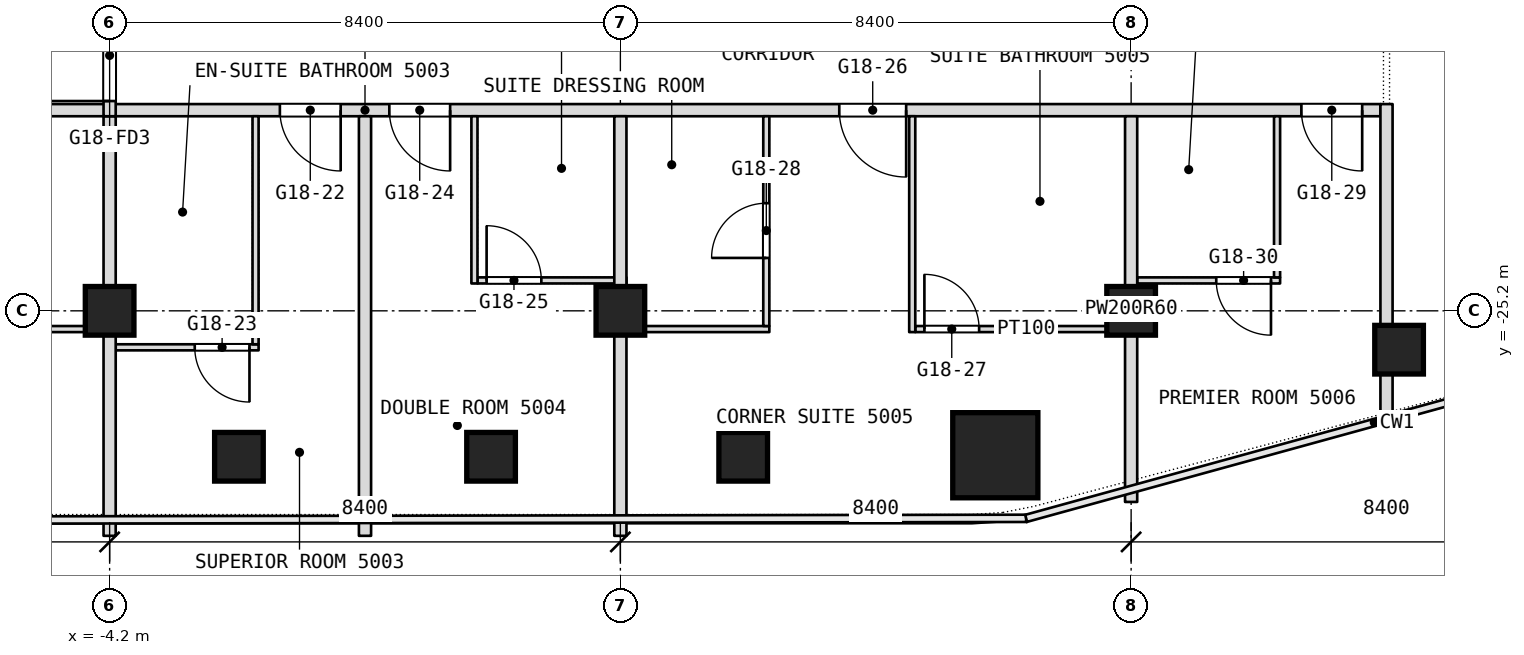
"""IFC4 building model, lengths in metres.
Left out: names, types, materials, properties, quantities, classifications, styles, units other than length and angle.
Written with IfcOpenShell. Run it as: python <this file> out.ifc"""

import sys

from ifc_helpers import new_model, si_unit, direction, frame, frame_2d, origin, origin_2d, place, context, subcontext, project, spatial, rectangle, extrude, element, fill, save


model = new_model("IFC4")
c1 = context("Model", 3, precision=1e-05, world=origin(), true_north=direction((0.0, 1.0)))
c2 = subcontext(c1, "Body", "Model", "MODEL_VIEW")
j1 = project(units=[si_unit("LENGTHUNIT", "METRE"), si_unit("PLANEANGLEUNIT", "RADIAN")], contexts=[c1])
p1 = place(None, origin())
s1 = spatial("IfcSite", under=j1, at=p1, CompositionType="ELEMENT")
p2 = place(p1, origin())
s2 = spatial("IfcBuilding", under=s1, at=p2, CompositionType="ELEMENT")
p3 = place(p2, frame((0.0, 0.0, 216.5)))
s3 = spatial("IfcBuildingStorey", under=s2, at=p3, CompositionType="ELEMENT", Elevation=216.5)
p4 = place(p3, frame((10.366, -27.575, 0.0), z_axis=(0.0, 0.0, 1.0), x_axis=(1.0, 0.0, 0.0)))
e1 = element("IfcColumn", 1, at=p4, inside=s3, PredefinedType="COLUMN", context=c2, shape_type="SweptSolid", body=[
    extrude(rectangle(XDim=1.4, YDim=1.4, at=origin_2d()), origin(), (0.0, 0.0, 1.0), 3.6),
])
for number, where, z_axis, x_axis in (
    (2, (-4.2, -25.2, 0.0), (0.0, 0.0, 1.0), (1.0, 0.0, 0.0)),
    (3, (4.2, -25.2, 0.0), (0.0, 0.0, 1.0), (1.0, 0.0, 0.0)),
    (4, (12.6, -25.2, 0.0), (0.0, 0.0, 1.0), (1.0, 0.0, 0.0)),
    (5, (17.007, -25.839, 0.0), (0.0, 0.0, 1.0), (1.0, 0.0, 0.0)),
    (6, (6.22, -27.6, 0.0), (0.0, 0.0, 1.0), (1.0, 0.0, 0.0)),
    (7, (2.073, -27.6, 0.0), (0.0, 0.0, 1.0), (1.0, 0.0, 0.0)),
    (8, (-2.073, -27.6, 0.0), (0.0, 0.0, 1.0), (1.0, 0.0, 0.0)),
):
    element("IfcColumn", number, at=place(p3, frame(where, z_axis=z_axis, x_axis=x_axis)), inside=s3, PredefinedType="COLUMN", context=c2, shape_type="SweptSolid", body=[
        extrude(rectangle(XDim=0.8, YDim=0.8, at=origin_2d()), origin(), (0.0, 0.0, 1.0), 3.6),
    ])
p5 = place(p3, frame((-4.1, -25.8, 0.0), z_axis=(0.0, 0.0, 1.0), x_axis=(1.0, 0.0, 0.0)))
e9 = element("IfcWall", 9, at=p5, inside=s3, PredefinedType="PARTITIONING", context=c2, shape_type="SweptSolid", body=[
    extrude(rectangle(XDim=2.35, YDim=0.1, at=frame_2d((1.175, 0.0))), origin(), (0.0, 0.0, 1.0), 3.34),
])
p6 = place(p5, frame((1.3, 0.0, 0.0)))
e10 = element("IfcOpeningElement", 10, at=p6, cuts=e9, PredefinedType="OPENING", context=c2, shape_type="SweptSolid", body=[
    extrude(rectangle(XDim=0.9, YDim=2.1, at=frame_2d((0.45, 1.05))), frame((0.0, 0.05, 0.0), z_axis=(0.0, -1.0, 0.0), x_axis=(1.0, 0.0, 0.0)), (0.0, 0.0, 1.0), 0.1),
])
p7 = place(p3, frame((-7.75, -25.5, 0.0), z_axis=(0.0, 0.0, 1.0), x_axis=(1.0, 0.0, 0.0)))
e11 = element("IfcWall", 11, at=p7, inside=s3, PredefinedType="PARTITIONING", context=c2, shape_type="SweptSolid", body=[
    extrude(rectangle(XDim=3.65, YDim=0.1, at=frame_2d((1.825, 0.0))), origin(), (0.0, 0.0, 1.0), 3.34),
])
p8 = place(p7, frame((0.15, 0.0, 0.0)))
e12 = element("IfcOpeningElement", 12, at=p8, cuts=e11, PredefinedType="OPENING", context=c2, shape_type="SweptSolid", body=[
    extrude(rectangle(XDim=0.9, YDim=2.1, at=frame_2d((0.45, 1.05))), frame((0.0, 0.05, 0.0), z_axis=(0.0, -1.0, 0.0), x_axis=(1.0, 0.0, 0.0)), (0.0, 0.0, 1.0), 0.1),
])
p9 = place(p3, frame((4.3, -25.5, 0.0), z_axis=(0.0, 0.0, 1.0), x_axis=(1.0, 0.0, 0.0)))
e13 = element("IfcWall", 13, at=p9, inside=s3, PredefinedType="PARTITIONING", context=c2, shape_type="SweptSolid", body=[
    extrude(rectangle(XDim=2.35, YDim=0.1, at=frame_2d((1.175, 0.0))), origin(), (0.0, 0.0, 1.0), 3.34),
])
p10 = place(p3, frame((9.05, -25.5, 0.0), z_axis=(0.0, 0.0, 1.0), x_axis=(1.0, 0.0, 0.0)))
e14 = element("IfcWall", 14, at=p10, inside=s3, PredefinedType="PARTITIONING", context=c2, shape_type="SweptSolid", body=[
    extrude(rectangle(XDim=3.65, YDim=0.1, at=frame_2d((1.825, 0.0))), origin(), (0.0, 0.0, 1.0), 3.34),
])
p11 = place(p10, frame((0.15, 0.0, 0.0)))
e15 = element("IfcOpeningElement", 15, at=p11, cuts=e14, PredefinedType="OPENING", context=c2, shape_type="SweptSolid", body=[
    extrude(rectangle(XDim=0.9, YDim=2.1, at=frame_2d((0.45, 1.05))), frame((0.0, 0.05, 0.0), z_axis=(0.0, -1.0, 0.0), x_axis=(1.0, 0.0, 0.0)), (0.0, 0.0, 1.0), 0.1),
])
p12 = place(p3, frame((1.85, -24.7, 0.0), z_axis=(0.0, 0.0, 1.0), x_axis=(1.0, 0.0, 0.0)))
e16 = element("IfcWall", 16, at=p12, inside=s3, PredefinedType="PARTITIONING", context=c2, shape_type="SweptSolid", body=[
    extrude(rectangle(XDim=2.45, YDim=0.1, at=frame_2d((1.225, 0.0))), origin(), (0.0, 0.0, 1.0), 3.34),
])
p13 = place(p12, frame((0.15, 0.0, 0.0)))
e17 = element("IfcOpeningElement", 17, at=p13, cuts=e16, PredefinedType="OPENING", context=c2, shape_type="SweptSolid", body=[
    extrude(rectangle(XDim=0.9, YDim=2.1, at=frame_2d((0.45, 1.05))), frame((0.0, 0.05, 0.0), z_axis=(0.0, -1.0, 0.0), x_axis=(1.0, 0.0, 0.0)), (0.0, 0.0, 1.0), 0.1),
])
p14 = place(p3, frame((12.7, -24.7, 0.0), z_axis=(0.0, 0.0, 1.0), x_axis=(1.0, 0.0, 0.0)))
e18 = element("IfcWall", 18, at=p14, inside=s3, PredefinedType="PARTITIONING", context=c2, shape_type="SweptSolid", body=[
    extrude(rectangle(XDim=2.35, YDim=0.1, at=frame_2d((1.175, 0.0))), origin(), (0.0, 0.0, 1.0), 3.34),
])
p15 = place(p14, frame((1.3, 0.0, 0.0)))
e19 = element("IfcOpeningElement", 19, at=p15, cuts=e18, PredefinedType="OPENING", context=c2, shape_type="SweptSolid", body=[
    extrude(rectangle(XDim=0.9, YDim=2.1, at=frame_2d((0.45, 1.05))), frame((0.0, 0.05, 0.0), z_axis=(0.0, -1.0, 0.0), x_axis=(1.0, 0.0, 0.0)), (0.0, 0.0, 1.0), 0.1),
])
p16 = place(p3, frame((-16.7, -21.9, 0.0), z_axis=(0.0, 0.0, 1.0), x_axis=(1.0, 0.0, 0.0)))
e20 = element("IfcWall", 20, at=p16, inside=s3, PredefinedType="PARTITIONING", context=c2, shape_type="SweptSolid", body=[
    extrude(rectangle(XDim=33.4, YDim=0.2, at=frame_2d((16.7, 0.0))), origin(), (0.0, 0.0, 1.0), 3.34),
])
p17 = place(p16, frame((2.7, 0.0, 0.0)))
e21 = element("IfcOpeningElement", 21, at=p17, cuts=e20, PredefinedType="OPENING", context=c2, shape_type="SweptSolid", body=[
    extrude(rectangle(XDim=1.0, YDim=2.1, at=frame_2d((0.5, 1.05))), frame((0.0, 0.1, 0.0), z_axis=(0.0, -1.0, 0.0), x_axis=(1.0, 0.0, 0.0)), (0.0, 0.0, 1.0), 0.2),
])
p18 = place(p16, frame((7.7, 0.0, 0.0)))
e22 = element("IfcOpeningElement", 22, at=p18, cuts=e20, PredefinedType="OPENING", context=c2, shape_type="SweptSolid", body=[
    extrude(rectangle(XDim=1.1, YDim=2.1, at=frame_2d((0.55, 1.05))), frame((0.0, 0.1, 0.0), z_axis=(0.0, -1.0, 0.0), x_axis=(1.0, 0.0, 0.0)), (0.0, 0.0, 1.0), 0.2),
])
p19 = place(p16, frame((15.3, 0.0, 0.0)))
e23 = element("IfcOpeningElement", 23, at=p19, cuts=e20, PredefinedType="OPENING", context=c2, shape_type="SweptSolid", body=[
    extrude(rectangle(XDim=1.0, YDim=2.1, at=frame_2d((0.5, 1.05))), frame((0.0, 0.1, 0.0), z_axis=(0.0, -1.0, 0.0), x_axis=(1.0, 0.0, 0.0)), (0.0, 0.0, 1.0), 0.2),
])
p20 = place(p16, frame((17.1, 0.0, 0.0)))
e24 = element("IfcOpeningElement", 24, at=p20, cuts=e20, PredefinedType="OPENING", context=c2, shape_type="SweptSolid", body=[
    extrude(rectangle(XDim=1.0, YDim=2.1, at=frame_2d((0.5, 1.05))), frame((0.0, 0.1, 0.0), z_axis=(0.0, -1.0, 0.0), x_axis=(1.0, 0.0, 0.0)), (0.0, 0.0, 1.0), 0.2),
])
p21 = place(p16, frame((24.5, 0.0, 0.0)))
e25 = element("IfcOpeningElement", 25, at=p21, cuts=e20, PredefinedType="OPENING", context=c2, shape_type="SweptSolid", body=[
    extrude(rectangle(XDim=1.1, YDim=2.1, at=frame_2d((0.55, 1.05))), frame((0.0, 0.1, 0.0), z_axis=(0.0, -1.0, 0.0), x_axis=(1.0, 0.0, 0.0)), (0.0, 0.0, 1.0), 0.2),
])
p22 = place(p16, frame((32.1, 0.0, 0.0)))
e26 = element("IfcOpeningElement", 26, at=p22, cuts=e20, PredefinedType="OPENING", context=c2, shape_type="SweptSolid", body=[
    extrude(rectangle(XDim=1.0, YDim=2.1, at=frame_2d((0.5, 1.05))), frame((0.0, 0.1, 0.0), z_axis=(0.0, -1.0, 0.0), x_axis=(1.0, 0.0, 0.0)), (0.0, 0.0, 1.0), 0.2),
])
p23 = place(p3, frame((16.8, -27.229, 0.0), z_axis=(0.0, 0.0, 1.0), x_axis=(0.0, 1.0, 0.0)))
e27 = element("IfcWall", 27, at=p23, inside=s3, PredefinedType="PARTITIONING", context=c2, shape_type="SweptSolid", body=[
    extrude(rectangle(XDim=5.429, YDim=0.2, at=frame_2d((2.714, 0.0))), origin(), (0.0, 0.0, 1.0), 3.34),
])
p24 = place(p3, frame((15.0, -24.65, 0.0), z_axis=(0.0, 0.0, 1.0), x_axis=(0.0, 1.0, 0.0)))
e28 = element("IfcWall", 28, at=p24, inside=s3, PredefinedType="PARTITIONING", context=c2, shape_type="SweptSolid", body=[
    extrude(rectangle(XDim=2.65, YDim=0.1, at=frame_2d((1.325, 0.0))), origin(), (0.0, 0.0, 1.0), 3.34),
])
p25 = place(p3, frame((12.6, -28.343, 0.0), z_axis=(0.0, 0.0, 1.0), x_axis=(0.0, 1.0, 0.0)))
e29 = element("IfcWall", 29, at=p25, inside=s3, PredefinedType="PARTITIONING", context=c2, shape_type="SweptSolid", body=[
    extrude(rectangle(XDim=6.343, YDim=0.2, at=frame_2d((3.171, 0.0))), origin(), (0.0, 0.0, 1.0), 3.34),
])
p26 = place(p3, frame((9.0, -25.55, 0.0), z_axis=(0.0, 0.0, 1.0), x_axis=(0.0, 1.0, 0.0)))
e30 = element("IfcWall", 30, at=p26, inside=s3, PredefinedType="PARTITIONING", context=c2, shape_type="SweptSolid", body=[
    extrude(rectangle(XDim=3.55, YDim=0.1, at=frame_2d((1.775, 0.0))), origin(), (0.0, 0.0, 1.0), 3.34),
])
p27 = place(p3, frame((6.6, -25.45, 0.0), z_axis=(0.0, 0.0, 1.0), x_axis=(0.0, 1.0, 0.0)))
e31 = element("IfcWall", 31, at=p27, inside=s3, PredefinedType="PARTITIONING", context=c2, shape_type="SweptSolid", body=[
    extrude(rectangle(XDim=3.45, YDim=0.1, at=frame_2d((1.725, 0.0))), origin(), (0.0, 0.0, 1.0), 3.34),
])
p28 = place(p27, frame((1.12, 0.0, 0.0)))
e32 = element("IfcOpeningElement", 32, at=p28, cuts=e31, PredefinedType="OPENING", context=c2, shape_type="SweptSolid", body=[
    extrude(rectangle(XDim=0.9, YDim=2.1, at=frame_2d((0.45, 1.05))), frame((0.0, 0.05, 0.0), z_axis=(0.0, -1.0, 0.0), x_axis=(1.0, 0.0, 0.0)), (0.0, 0.0, 1.0), 0.1),
])
p29 = place(p3, frame((4.2, -28.9, 0.0), z_axis=(0.0, 0.0, 1.0), x_axis=(0.0, 1.0, 0.0)))
e33 = element("IfcWall", 33, at=p29, inside=s3, PredefinedType="PARTITIONING", context=c2, shape_type="SweptSolid", body=[
    extrude(rectangle(XDim=6.9, YDim=0.2, at=frame_2d((3.45, 0.0))), origin(), (0.0, 0.0, 1.0), 3.34),
])
p30 = place(p3, frame((1.8, -24.75, 0.0), z_axis=(0.0, 0.0, 1.0), x_axis=(0.0, 1.0, 0.0)))
e34 = element("IfcWall", 34, at=p30, inside=s3, PredefinedType="PARTITIONING", context=c2, shape_type="SweptSolid", body=[
    extrude(rectangle(XDim=2.75, YDim=0.1, at=frame_2d((1.375, 0.0))), origin(), (0.0, 0.0, 1.0), 3.34),
])
p31 = place(p3, frame((0.0, -28.9, 0.0), z_axis=(0.0, 0.0, 1.0), x_axis=(0.0, 1.0, 0.0)))
e35 = element("IfcWall", 35, at=p31, inside=s3, PredefinedType="PARTITIONING", context=c2, shape_type="SweptSolid", body=[
    extrude(rectangle(XDim=6.9, YDim=0.2, at=frame_2d((3.45, 0.0))), origin(), (0.0, 0.0, 1.0), 3.34),
])
p32 = place(p3, frame((-1.8, -25.75, 0.0), z_axis=(0.0, 0.0, 1.0), x_axis=(0.0, 1.0, 0.0)))
e36 = element("IfcWall", 36, at=p32, inside=s3, PredefinedType="PARTITIONING", context=c2, shape_type="SweptSolid", body=[
    extrude(rectangle(XDim=3.75, YDim=0.1, at=frame_2d((1.875, 0.0))), origin(), (0.0, 0.0, 1.0), 3.34),
])
p33 = place(p3, frame((-4.2, -28.9, 0.0), z_axis=(0.0, 0.0, 1.0), x_axis=(0.0, 1.0, 0.0)))
e37 = element("IfcWall", 37, at=p33, inside=s3, PredefinedType="PARTITIONING", context=c2, shape_type="SweptSolid", body=[
    extrude(rectangle(XDim=6.9, YDim=0.2, at=frame_2d((3.45, 0.0))), origin(), (0.0, 0.0, 1.0), 3.34),
])
p34 = place(p3, frame((-4.2, -22.0, 0.0), z_axis=(0.0, 0.0, 1.0), x_axis=(0.0, 1.0, 0.0)))
e38 = element("IfcWall", 38, at=p34, inside=s3, PredefinedType="PARTITIONING", context=c2, shape_type="SweptSolid", body=[
    extrude(rectangle(XDim=8.4, YDim=0.2, at=frame_2d((4.2, 0.0))), origin(), (0.0, 0.0, 1.0), 3.34),
])
p35 = place(p34, frame((0.25, 0.0, 0.0)))
e39 = element("IfcOpeningElement", 39, at=p35, cuts=e38, PredefinedType="OPENING", context=c2, shape_type="SweptSolid", body=[
    extrude(rectangle(XDim=1.5, YDim=2.1, at=frame_2d((0.75, 1.05))), frame((0.0, 0.1, 0.0), z_axis=(0.0, -1.0, 0.0), x_axis=(1.0, 0.0, 0.0)), (0.0, 0.0, 1.0), 0.2),
])
p36 = place(p6, origin())
e40 = element("IfcDoor", 40, at=p36, inside=s3, OperationType="SINGLE_SWING_RIGHT", PredefinedType="DOOR", context=c2, shape_type="SweptSolid", body=[
    extrude(rectangle(XDim=0.9, YDim=2.1, at=frame_2d((0.45, 1.05))), frame((0.0, 0.025, 0.0), z_axis=(0.0, -1.0, 0.0), x_axis=(1.0, 0.0, 0.0)), (0.0, 0.0, 1.0), 0.05),
])
fill(e10, e40)
p37 = place(p11, origin())
e41 = element("IfcDoor", 41, at=p37, inside=s3, OperationType="SINGLE_SWING_LEFT", PredefinedType="DOOR", context=c2, shape_type="SweptSolid", body=[
    extrude(rectangle(XDim=0.9, YDim=2.1, at=frame_2d((0.45, 1.05))), frame((0.0, 0.025, 0.0), z_axis=(0.0, -1.0, 0.0), x_axis=(1.0, 0.0, 0.0)), (0.0, 0.0, 1.0), 0.05),
])
fill(e15, e41)
p38 = place(p13, origin())
e42 = element("IfcDoor", 42, at=p38, inside=s3, OperationType="SINGLE_SWING_LEFT", PredefinedType="DOOR", context=c2, shape_type="SweptSolid", body=[
    extrude(rectangle(XDim=0.9, YDim=2.1, at=frame_2d((0.45, 1.05))), frame((0.0, 0.025, 0.0), z_axis=(0.0, -1.0, 0.0), x_axis=(1.0, 0.0, 0.0)), (0.0, 0.0, 1.0), 0.05),
])
fill(e17, e42)
p39 = place(p15, origin())
e43 = element("IfcDoor", 43, at=p39, inside=s3, OperationType="SINGLE_SWING_RIGHT", PredefinedType="DOOR", context=c2, shape_type="SweptSolid", body=[
    extrude(rectangle(XDim=0.9, YDim=2.1, at=frame_2d((0.45, 1.05))), frame((0.0, 0.025, 0.0), z_axis=(0.0, -1.0, 0.0), x_axis=(1.0, 0.0, 0.0)), (0.0, 0.0, 1.0), 0.05),
])
fill(e19, e43)
p40 = place(p19, origin())
e44 = element("IfcDoor", 44, at=p40, inside=s3, OperationType="SINGLE_SWING_RIGHT", PredefinedType="DOOR", context=c2, shape_type="SweptSolid", body=[
    extrude(rectangle(XDim=1.0, YDim=2.1, at=frame_2d((0.5, 1.05))), frame((0.0, 0.025, 0.0), z_axis=(0.0, -1.0, 0.0), x_axis=(1.0, 0.0, 0.0)), (0.0, 0.0, 1.0), 0.05),
])
fill(e23, e44)
p41 = place(p20, origin())
e45 = element("IfcDoor", 45, at=p41, inside=s3, OperationType="SINGLE_SWING_RIGHT", PredefinedType="DOOR", context=c2, shape_type="SweptSolid", body=[
    extrude(rectangle(XDim=1.0, YDim=2.1, at=frame_2d((0.5, 1.05))), frame((0.0, 0.025, 0.0), z_axis=(0.0, -1.0, 0.0), x_axis=(1.0, 0.0, 0.0)), (0.0, 0.0, 1.0), 0.05),
])
fill(e24, e45)
p42 = place(p21, origin())
e46 = element("IfcDoor", 46, at=p42, inside=s3, OperationType="SINGLE_SWING_LEFT", PredefinedType="DOOR", context=c2, shape_type="SweptSolid", body=[
    extrude(rectangle(XDim=1.1, YDim=2.1, at=frame_2d((0.55, 1.05))), frame((0.0, 0.025, 0.0), z_axis=(0.0, -1.0, 0.0), x_axis=(1.0, 0.0, 0.0)), (0.0, 0.0, 1.0), 0.05),
])
fill(e25, e46)
p43 = place(p22, origin())
e47 = element("IfcDoor", 47, at=p43, inside=s3, OperationType="SINGLE_SWING_LEFT", PredefinedType="DOOR", context=c2, shape_type="SweptSolid", body=[
    extrude(rectangle(XDim=1.0, YDim=2.1, at=frame_2d((0.5, 1.05))), frame((0.0, 0.025, 0.0), z_axis=(0.0, -1.0, 0.0), x_axis=(1.0, 0.0, 0.0)), (0.0, 0.0, 1.0), 0.05),
])
fill(e26, e47)
p44 = place(p28, origin())
e48 = element("IfcDoor", 48, at=p44, inside=s3, OperationType="SINGLE_SWING_LEFT", PredefinedType="DOOR", context=c2, shape_type="SweptSolid", body=[
    extrude(rectangle(XDim=0.9, YDim=2.1, at=frame_2d((0.45, 1.05))), frame((0.0, 0.025, 0.0), z_axis=(0.0, -1.0, 0.0), x_axis=(1.0, 0.0, 0.0)), (0.0, 0.0, 1.0), 0.05),
])
fill(e32, e48)
p45 = place(p35, origin())
e49 = element("IfcDoor", 49, at=p45, inside=s3, OperationType="DOUBLE_DOOR_DOUBLE_SWING", PredefinedType="DOOR", context=c2, shape_type="SweptSolid", body=[
    extrude(rectangle(XDim=1.5, YDim=2.1, at=frame_2d((0.75, 1.05))), frame((0.0, 0.025, 0.0), z_axis=(0.0, -1.0, 0.0), x_axis=(1.0, 0.0, 0.0)), (0.0, 0.0, 1.0), 0.05),
])
fill(e39, e49)
save(model, sys.argv[1])
